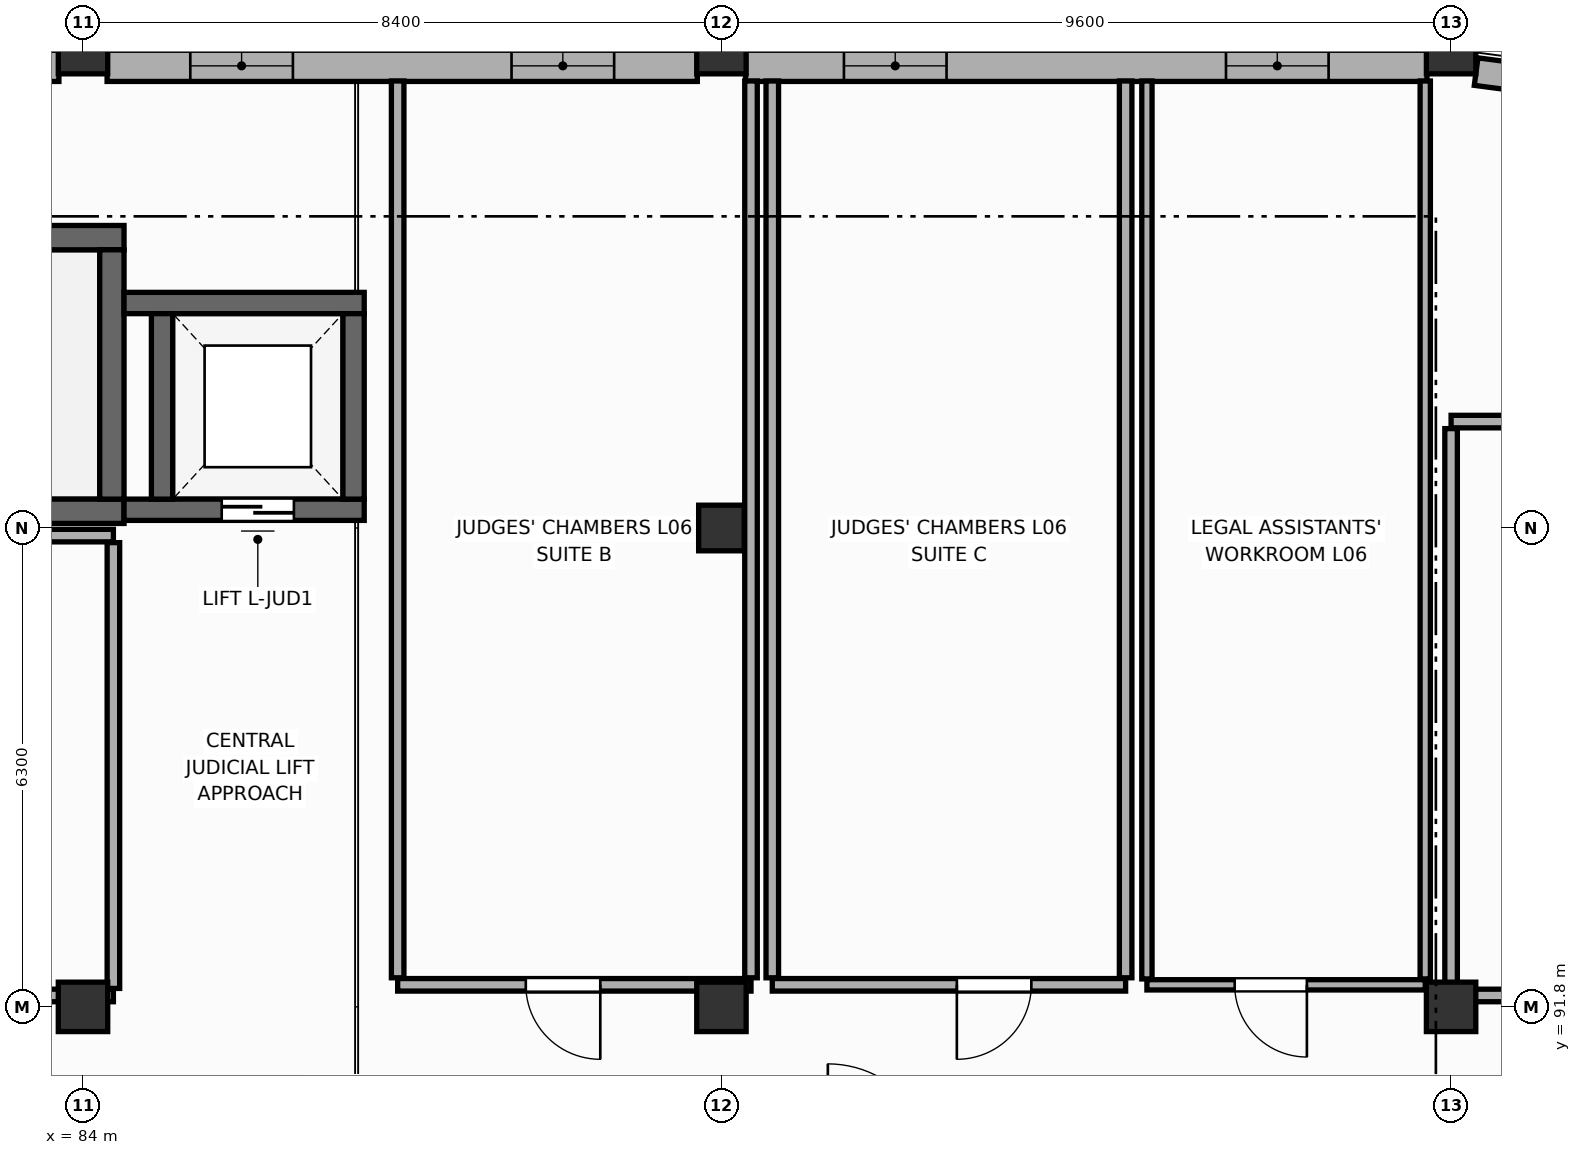
"""IFC4 building model, lengths in metres.
Left out: names, types, materials, properties, quantities, classifications, styles, units other than length and angle.
Written with IfcOpenShell. Run it as: python <this file> out.ifc"""

import sys

from ifc_helpers import new_model, si_unit, direction, frame, frame_2d, origin, origin_2d, place, context, subcontext, project, spatial, rectangle, extrude, element, fill, save


model = new_model("IFC4")
c1 = context("Model", 3, precision=1e-05, world=origin(), true_north=direction((0.0, 1.0)))
c2 = subcontext(c1, "Body", "Model", "MODEL_VIEW")
j1 = project(units=[si_unit("LENGTHUNIT", "METRE"), si_unit("PLANEANGLEUNIT", "RADIAN")], contexts=[c1])
p1 = place(None, origin())
s1 = spatial("IfcSite", under=j1, at=p1, CompositionType="ELEMENT")
p2 = place(p1, origin())
s2 = spatial("IfcBuilding", under=s1, at=p2, CompositionType="ELEMENT")
p3 = place(p2, frame((0.0, 0.0, 22.8)))
s3 = spatial("IfcBuildingStorey", under=s2, at=p3, CompositionType="ELEMENT", Elevation=22.8)
for number, where, z_axis, x_axis in (
    (1, (84.0, 91.8, 0.0), (0.0, 0.0, 1.0), (1.0, 0.0, 0.0)),
    (2, (84.0, 104.4, 0.0), (0.0, 0.0, 1.0), (1.0, 0.0, 0.0)),
    (3, (92.4, 91.8, 0.0), (0.0, 0.0, 1.0), (1.0, 0.0, 0.0)),
    (4, (92.4, 104.4, 0.0), (0.0, 0.0, 1.0), (1.0, 0.0, 0.0)),
):
    element("IfcColumn", number, at=place(p3, frame(where, z_axis=z_axis, x_axis=x_axis)), inside=s3, PredefinedType="COLUMN", context=c2, shape_type="SweptSolid", body=[
        extrude(rectangle(XDim=0.65, YDim=0.65, at=origin_2d()), origin(), (0.0, 0.0, 1.0), 4.2),
    ])
p4 = place(p3, frame((92.4, 98.1, 0.0), z_axis=(0.0, 0.0, 1.0), x_axis=(1.0, 0.0, 0.0)))
e5 = element("IfcColumn", 5, at=p4, inside=s3, PredefinedType="COLUMN", context=c2, shape_type="SweptSolid", body=[
    extrude(rectangle(XDim=0.6, YDim=0.6, at=origin_2d()), origin(), (0.0, 0.0, 1.0), 4.2),
])
for number, where, z_axis, x_axis in (
    (6, (102.0, 91.8, 0.0), (0.0, 0.0, 1.0), (1.0, 0.0, 0.0)),
    (7, (102.0, 104.4, 0.0), (0.0, 0.0, 1.0), (1.0, 0.0, 0.0)),
):
    element("IfcColumn", number, at=place(p3, frame(where, z_axis=z_axis, x_axis=x_axis)), inside=s3, PredefinedType="COLUMN", context=c2, shape_type="SweptSolid", body=[
        extrude(rectangle(XDim=0.65, YDim=0.65, at=origin_2d()), origin(), (0.0, 0.0, 1.0), 4.2),
    ])
p5 = place(p3, frame((75.917, 104.18, 0.0), z_axis=(0.0, 0.0, 1.0), x_axis=(1.0, 0.0, 0.0)))
e8 = element("IfcWall", 8, at=p5, inside=s3, PredefinedType="STANDARD", context=c2, shape_type="SweptSolid", body=[
    extrude(rectangle(XDim=7.766, YDim=0.41, at=frame_2d((3.883, 0.0))), origin(), (0.0, 0.0, 1.0), 3.1),
])
p6 = place(p3, frame((84.317, 104.18, 0.0), z_axis=(0.0, 0.0, 1.0), x_axis=(1.0, 0.0, 0.0)))
e9 = element("IfcWall", 9, at=p6, inside=s3, PredefinedType="STANDARD", context=c2, shape_type="SweptSolid", body=[
    extrude(rectangle(XDim=7.766, YDim=0.41, at=frame_2d((3.883, 0.0))), origin(), (0.0, 0.0, 1.0), 3.1),
])
p7 = place(p6, frame((1.095, 0.0, 0.85)))
e10 = element("IfcOpeningElement", 10, at=p7, cuts=e9, PredefinedType="OPENING", context=c2, shape_type="SweptSolid", body=[
    extrude(rectangle(XDim=1.35, YDim=1.95, at=frame_2d((0.675, 0.975))), frame((0.0, 0.215, 0.0), z_axis=(0.0, -1.0, 0.0), x_axis=(1.0, 0.0, 0.0)), (0.0, 0.0, 1.0), 0.43),
])
p8 = place(p6, frame((5.321, 0.0, 0.85)))
e11 = element("IfcOpeningElement", 11, at=p8, cuts=e9, PredefinedType="OPENING", context=c2, shape_type="SweptSolid", body=[
    extrude(rectangle(XDim=1.35, YDim=1.95, at=frame_2d((0.675, 0.975))), frame((0.0, 0.215, 0.0), z_axis=(0.0, -1.0, 0.0), x_axis=(1.0, 0.0, 0.0)), (0.0, 0.0, 1.0), 0.43),
])
p9 = place(p3, frame((92.717, 104.18, 0.0), z_axis=(0.0, 0.0, 1.0), x_axis=(1.0, 0.0, 0.0)))
e12 = element("IfcWall", 12, at=p9, inside=s3, PredefinedType="STANDARD", context=c2, shape_type="SweptSolid", body=[
    extrude(rectangle(XDim=8.966, YDim=0.41, at=frame_2d((4.483, 0.0))), origin(), (0.0, 0.0, 1.0), 3.1),
])
p10 = place(p9, frame((1.295, 0.0, 0.85)))
e13 = element("IfcOpeningElement", 13, at=p10, cuts=e12, PredefinedType="OPENING", context=c2, shape_type="SweptSolid", body=[
    extrude(rectangle(XDim=1.35, YDim=1.95, at=frame_2d((0.675, 0.975))), frame((0.0, 0.215, 0.0), z_axis=(0.0, -1.0, 0.0), x_axis=(1.0, 0.0, 0.0)), (0.0, 0.0, 1.0), 0.43),
])
p11 = place(p9, frame((6.321, 0.0, 0.85)))
e14 = element("IfcOpeningElement", 14, at=p11, cuts=e12, PredefinedType="OPENING", context=c2, shape_type="SweptSolid", body=[
    extrude(rectangle(XDim=1.35, YDim=1.95, at=frame_2d((0.675, 0.975))), frame((0.0, 0.215, 0.0), z_axis=(0.0, -1.0, 0.0), x_axis=(1.0, 0.0, 0.0)), (0.0, 0.0, 1.0), 0.43),
])
p12 = place(p3, frame((105.229, 103.723, 0.0), z_axis=(0.0, 0.0, 1.0), x_axis=(-0.99144889538, 0.13049554724, 0.0)))
e15 = element("IfcWall", 15, at=p12, inside=s3, PredefinedType="ELEMENTEDWALL", context=c2, shape_type="SweptSolid", body=[
    extrude(rectangle(XDim=2.924, YDim=0.365, at=frame_2d((1.462, 0.0))), origin(), (0.0, 0.0, 1.0), 3.1),
])
p13 = place(p12, frame((1.062, 0.0, 0.85)))
e16 = element("IfcOpeningElement", 16, at=p13, cuts=e15, PredefinedType="OPENING", context=c2, shape_type="SweptSolid", body=[
    extrude(rectangle(XDim=0.8, YDim=1.7, at=frame_2d((0.4, 0.85))), frame((0.0, 0.192, 0.0), z_axis=(0.0, -1.0, 0.0), x_axis=(1.0, 0.0, 0.0)), (0.0, 0.0, 1.0), 0.385),
])
for number, where, z_axis, x_axis in (
    (17, (75.46, 101.92, 0.0), (0.0, 0.0, 1.0), (1.0, 0.0, 0.0)),
    (18, (84.54, 98.32, 0.0), (0.0, 0.0, 1.0), (-1.0, 0.0, 0.0)),
):
    element("IfcWall", number, at=place(p3, frame(where, z_axis=z_axis, x_axis=x_axis)), inside=s3, PredefinedType="SHEAR", context=c2, shape_type="SweptSolid", body=[
        extrude(rectangle(XDim=9.08, YDim=0.32, at=frame_2d((4.54, 0.0))), origin(), (0.0, 0.0, 1.0), 3.97),
    ])
p14 = place(p3, frame((84.38, 101.76, 0.0), z_axis=(0.0, 0.0, 1.0), x_axis=(0.0, -1.0, 0.0)))
e19 = element("IfcWall", 19, at=p14, inside=s3, PredefinedType="SHEAR", context=c2, shape_type="SweptSolid", body=[
    extrude(rectangle(XDim=3.28, YDim=0.32, at=frame_2d((1.64, 0.0))), origin(), (0.0, 0.0, 1.0), 3.97),
])
p15 = place(p3, frame((84.54, 101.06, 0.0), z_axis=(0.0, 0.0, 1.0), x_axis=(1.0, 0.0, 0.0)))
e20 = element("IfcWall", 20, at=p15, inside=s3, PredefinedType="SHEAR", context=c2, shape_type="SweptSolid", body=[
    extrude(rectangle(XDim=3.16, YDim=0.28, at=frame_2d((1.58, 0.0))), origin(), (0.0, 0.0, 1.0), 3.97),
])
p16 = place(p3, frame((87.7, 98.34, 0.0), z_axis=(0.0, 0.0, 1.0), x_axis=(-1.0, 0.0, 0.0)))
e21 = element("IfcWall", 21, at=p16, inside=s3, PredefinedType="SHEAR", context=c2, shape_type="SweptSolid", body=[
    extrude(rectangle(XDim=3.16, YDim=0.28, at=frame_2d((1.58, 0.0))), origin(), (0.0, 0.0, 1.0), 3.97),
])
p17 = place(p16, frame((0.925, 0.0, 0.0)))
e22 = element("IfcOpeningElement", 22, at=p17, cuts=e21, PredefinedType="OPENING", context=c2, shape_type="SweptSolid", body=[
    extrude(rectangle(XDim=0.95, YDim=2.15, at=frame_2d((0.475, 1.075))), frame((0.0, 0.15, 0.0), z_axis=(0.0, -1.0, 0.0), x_axis=(1.0, 0.0, 0.0)), (0.0, 0.0, 1.0), 0.3),
])
for number, where, z_axis, x_axis in (
    (23, (85.04, 98.48, 0.0), (0.0, 0.0, 1.0), (0.0, 1.0, 0.0)),
    (24, (87.56, 100.92, 0.0), (0.0, 0.0, 1.0), (0.0, -1.0, 0.0)),
):
    element("IfcWall", number, at=place(p3, frame(where, z_axis=z_axis, x_axis=x_axis)), inside=s3, PredefinedType="SHEAR", context=c2, shape_type="SweptSolid", body=[
        extrude(rectangle(XDim=2.44, YDim=0.28, at=frame_2d((1.22, 0.0))), origin(), (0.0, 0.0, 1.0), 3.97),
    ])
p18 = place(p3, frame((75.6, 98.0, 0.0), z_axis=(0.0, 0.0, 1.0), x_axis=(1.0, 0.0, 0.0)))
e25 = element("IfcWall", 25, at=p18, inside=s3, PredefinedType="PARTITIONING", context=c2, shape_type="SweptSolid", body=[
    extrude(rectangle(XDim=8.8, YDim=0.165, at=frame_2d((4.4, 0.0))), origin(), (0.0, 0.0, 1.0), 3.1),
])
p19 = place(p3, frame((84.4, 91.95, 0.0), z_axis=(0.0, 0.0, 1.0), x_axis=(-1.0, 0.0, 0.0)))
e26 = element("IfcWall", 26, at=p19, inside=s3, PredefinedType="PARTITIONING", context=c2, shape_type="SweptSolid", body=[
    extrude(rectangle(XDim=8.8, YDim=0.165, at=frame_2d((4.4, 0.0))), origin(), (0.0, 0.0, 1.0), 3.1),
])
p20 = place(p19, frame((3.545, 0.0, 0.0)))
e27 = element("IfcOpeningElement", 27, at=p20, cuts=e26, PredefinedType="OPENING", context=c2, shape_type="SweptSolid", body=[
    extrude(rectangle(XDim=1.0, YDim=2.15, at=frame_2d((0.5, 1.075))), frame((0.0, 0.093, 0.0), z_axis=(0.0, -1.0, 0.0), x_axis=(1.0, 0.0, 0.0)), (0.0, 0.0, 1.0), 0.185),
])
p21 = place(p3, frame((84.4, 97.907, 0.0), z_axis=(0.0, 0.0, 1.0), x_axis=(0.0, -1.0, 0.0)))
e28 = element("IfcWall", 28, at=p21, inside=s3, PredefinedType="PARTITIONING", context=c2, shape_type="SweptSolid", body=[
    extrude(rectangle(XDim=5.865, YDim=0.165, at=frame_2d((2.933, 0.0))), origin(), (0.0, 0.0, 1.0), 3.1),
])
p22 = place(p3, frame((92.789, 92.09, 0.0), z_axis=(0.0, 0.0, 1.0), x_axis=(-1.0, 0.0, 0.0)))
e29 = element("IfcWall", 29, at=p22, inside=s3, PredefinedType="PARTITIONING", context=c2, shape_type="SweptSolid", body=[
    extrude(rectangle(XDim=4.649, YDim=0.165, at=frame_2d((2.325, 0.0))), origin(), (0.0, 0.0, 1.0), 3.3),
])
p23 = place(p22, frame((1.983, 0.0, 0.0)))
e30 = element("IfcOpeningElement", 30, at=p23, cuts=e29, PredefinedType="OPENING", context=c2, shape_type="SweptSolid", body=[
    extrude(rectangle(XDim=0.98, YDim=2.2, at=frame_2d((0.49, 1.1))), frame((0.0, 0.093, 0.0), z_axis=(0.0, -1.0, 0.0), x_axis=(1.0, 0.0, 0.0)), (0.0, 0.0, 1.0), 0.185),
])
p24 = place(p3, frame((88.14, 92.183, 0.0), z_axis=(0.0, 0.0, 1.0), x_axis=(0.0, 1.0, 0.0)))
e31 = element("IfcWall", 31, at=p24, inside=s3, PredefinedType="PARTITIONING", context=c2, shape_type="SweptSolid", body=[
    extrude(rectangle(XDim=11.798, YDim=0.165, at=frame_2d((5.899, 0.0))), origin(), (0.0, 0.0, 1.0), 3.4),
])
p25 = place(p3, frame((92.789, 103.981, 0.0), z_axis=(0.0, 0.0, 1.0), x_axis=(0.0, -1.0, 0.0)))
e32 = element("IfcWall", 32, at=p25, inside=s3, PredefinedType="PARTITIONING", context=c2, shape_type="SweptSolid", body=[
    extrude(rectangle(XDim=11.798, YDim=0.165, at=frame_2d((5.899, 0.0))), origin(), (0.0, 0.0, 1.0), 3.3),
])
p26 = place(p3, frame((97.718, 92.09, 0.0), z_axis=(0.0, 0.0, 1.0), x_axis=(-1.0, 0.0, 0.0)))
e33 = element("IfcWall", 33, at=p26, inside=s3, PredefinedType="PARTITIONING", context=c2, shape_type="SweptSolid", body=[
    extrude(rectangle(XDim=4.649, YDim=0.165, at=frame_2d((2.324, 0.0))), origin(), (0.0, 0.0, 1.0), 3.3),
])
p27 = place(p26, frame((1.241, 0.0, 0.0)))
e34 = element("IfcOpeningElement", 34, at=p27, cuts=e33, PredefinedType="OPENING", context=c2, shape_type="SweptSolid", body=[
    extrude(rectangle(XDim=0.98, YDim=2.2, at=frame_2d((0.49, 1.1))), frame((0.0, 0.093, 0.0), z_axis=(0.0, -1.0, 0.0), x_axis=(1.0, 0.0, 0.0)), (0.0, 0.0, 1.0), 0.185),
])
for number, where, z_axis, x_axis in (
    (35, (93.069, 92.183, 0.0), (0.0, 0.0, 1.0), (0.0, 1.0, 0.0)),
    (36, (97.718, 103.981, 0.0), (0.0, 0.0, 1.0), (0.0, -1.0, 0.0)),
):
    element("IfcWall", number, at=place(p3, frame(where, z_axis=z_axis, x_axis=x_axis)), inside=s3, PredefinedType="PARTITIONING", context=c2, shape_type="SweptSolid", body=[
        extrude(rectangle(XDim=11.798, YDim=0.165, at=frame_2d((5.899, 0.0))), origin(), (0.0, 0.0, 1.0), 3.3),
    ])
p28 = place(p3, frame((101.66, 92.09, 0.0), z_axis=(0.0, 0.0, 1.0), x_axis=(-1.0, 0.0, 0.0)))
e37 = element("IfcWall", 37, at=p28, inside=s3, PredefinedType="PARTITIONING", context=c2, shape_type="SweptSolid", body=[
    extrude(rectangle(XDim=3.662, YDim=0.135, at=frame_2d((1.831, 0.0))), origin(), (0.0, 0.0, 1.0), 3.1),
])
p29 = place(p28, frame((1.557, 0.0, 0.0)))
e38 = element("IfcOpeningElement", 38, at=p29, cuts=e37, PredefinedType="OPENING", context=c2, shape_type="SweptSolid", body=[
    extrude(rectangle(XDim=0.95, YDim=2.15, at=frame_2d((0.475, 1.075))), frame((0.0, 0.077, 0.0), z_axis=(0.0, -1.0, 0.0), x_axis=(1.0, 0.0, 0.0)), (0.0, 0.0, 1.0), 0.155),
])
p30 = place(p3, frame((97.998, 92.167, 0.0), z_axis=(0.0, 0.0, 1.0), x_axis=(0.0, 1.0, 0.0)))
e39 = element("IfcWall", 39, at=p30, inside=s3, PredefinedType="PARTITIONING", context=c2, shape_type="SweptSolid", body=[
    extrude(rectangle(XDim=11.813, YDim=0.135, at=frame_2d((5.907, 0.0))), origin(), (0.0, 0.0, 1.0), 3.3),
])
p31 = place(p3, frame((101.66, 103.981, 0.0), z_axis=(0.0, 0.0, 1.0), x_axis=(0.0, -1.0, 0.0)))
e40 = element("IfcWall", 40, at=p31, inside=s3, PredefinedType="PARTITIONING", context=c2, shape_type="SweptSolid", body=[
    extrude(rectangle(XDim=11.813, YDim=0.135, at=frame_2d((5.907, 0.0))), origin(), (0.0, 0.0, 1.0), 3.1),
])
p32 = place(p3, frame((102.0, 99.5, 0.0), z_axis=(0.0, 0.0, 1.0), x_axis=(1.0, 0.0, 0.0)))
e41 = element("IfcWall", 41, at=p32, inside=s3, PredefinedType="PARTITIONING", context=c2, shape_type="SweptSolid", body=[
    extrude(rectangle(XDim=9.5, YDim=0.165, at=frame_2d((4.75, 0.0))), origin(), (0.0, 0.0, 1.0), 3.0),
])
p33 = place(p3, frame((111.5, 91.95, 0.0), z_axis=(0.0, 0.0, 1.0), x_axis=(-1.0, 0.0, 0.0)))
e42 = element("IfcWall", 42, at=p33, inside=s3, PredefinedType="PARTITIONING", context=c2, shape_type="SweptSolid", body=[
    extrude(rectangle(XDim=9.5, YDim=0.165, at=frame_2d((4.75, 0.0))), origin(), (0.0, 0.0, 1.0), 3.0),
])
p34 = place(p33, frame((1.132, 0.0, 0.0)))
e43 = element("IfcOpeningElement", 43, at=p34, cuts=e42, PredefinedType="OPENING", context=c2, shape_type="SweptSolid", body=[
    extrude(rectangle(XDim=0.98, YDim=2.2, at=frame_2d((0.49, 1.1))), frame((0.0, 0.093, 0.0), z_axis=(0.0, -1.0, 0.0), x_axis=(1.0, 0.0, 0.0)), (0.0, 0.0, 1.0), 0.185),
])
p35 = place(p3, frame((102.0, 92.042, 0.0), z_axis=(0.0, 0.0, 1.0), x_axis=(0.0, 1.0, 0.0)))
e44 = element("IfcWall", 44, at=p35, inside=s3, PredefinedType="PARTITIONING", context=c2, shape_type="SweptSolid", body=[
    extrude(rectangle(XDim=7.365, YDim=0.165, at=frame_2d((3.683, 0.0))), origin(), (0.0, 0.0, 1.0), 3.1),
])
p36 = place(p7, origin())
e45 = element("IfcWindow", 45, at=p36, inside=s3, PartitioningType="SINGLE_PANEL", PredefinedType="WINDOW", context=c2, shape_type="SweptSolid", body=[
    extrude(rectangle(XDim=1.35, YDim=1.95, at=frame_2d((0.675, 0.975))), frame((0.0, 0.03, 0.0), z_axis=(0.0, -1.0, 0.0), x_axis=(1.0, 0.0, 0.0)), (0.0, 0.0, 1.0), 0.06),
])
fill(e10, e45)
p37 = place(p8, origin())
e46 = element("IfcWindow", 46, at=p37, inside=s3, PartitioningType="SINGLE_PANEL", PredefinedType="WINDOW", context=c2, shape_type="SweptSolid", body=[
    extrude(rectangle(XDim=1.35, YDim=1.95, at=frame_2d((0.675, 0.975))), frame((0.0, 0.03, 0.0), z_axis=(0.0, -1.0, 0.0), x_axis=(1.0, 0.0, 0.0)), (0.0, 0.0, 1.0), 0.06),
])
fill(e11, e46)
p38 = place(p10, origin())
e47 = element("IfcWindow", 47, at=p38, inside=s3, PartitioningType="SINGLE_PANEL", PredefinedType="WINDOW", context=c2, shape_type="SweptSolid", body=[
    extrude(rectangle(XDim=1.35, YDim=1.95, at=frame_2d((0.675, 0.975))), frame((0.0, 0.03, 0.0), z_axis=(0.0, -1.0, 0.0), x_axis=(1.0, 0.0, 0.0)), (0.0, 0.0, 1.0), 0.06),
])
fill(e13, e47)
p39 = place(p11, origin())
e48 = element("IfcWindow", 48, at=p39, inside=s3, PartitioningType="SINGLE_PANEL", PredefinedType="WINDOW", context=c2, shape_type="SweptSolid", body=[
    extrude(rectangle(XDim=1.35, YDim=1.95, at=frame_2d((0.675, 0.975))), frame((0.0, 0.03, 0.0), z_axis=(0.0, -1.0, 0.0), x_axis=(1.0, 0.0, 0.0)), (0.0, 0.0, 1.0), 0.06),
])
fill(e14, e48)
p40 = place(p17, origin())
e49 = element("IfcDoor", 49, at=p40, inside=s3, OperationType="DOUBLE_DOOR_SLIDING", PredefinedType="DOOR", context=c2, shape_type="SweptSolid", body=[
    extrude(rectangle(XDim=0.95, YDim=2.15, at=frame_2d((0.475, 1.075))), frame((0.0, 0.025, 0.0), z_axis=(0.0, -1.0, 0.0), x_axis=(1.0, 0.0, 0.0)), (0.0, 0.0, 1.0), 0.05),
])
fill(e22, e49)
p41 = place(p23, origin())
e50 = element("IfcDoor", 50, at=p41, inside=s3, OperationType="SINGLE_SWING_LEFT", PredefinedType="DOOR", context=c2, shape_type="SweptSolid", body=[
    extrude(rectangle(XDim=0.98, YDim=2.2, at=frame_2d((0.49, 1.1))), frame((0.0, 0.025, 0.0), z_axis=(0.0, -1.0, 0.0), x_axis=(1.0, 0.0, 0.0)), (0.0, 0.0, 1.0), 0.05),
])
fill(e30, e50)
p42 = place(p27, origin())
e51 = element("IfcDoor", 51, at=p42, inside=s3, OperationType="SINGLE_SWING_RIGHT", PredefinedType="DOOR", context=c2, shape_type="SweptSolid", body=[
    extrude(rectangle(XDim=0.98, YDim=2.2, at=frame_2d((0.49, 1.1))), frame((0.0, 0.025, 0.0), z_axis=(0.0, -1.0, 0.0), x_axis=(1.0, 0.0, 0.0)), (0.0, 0.0, 1.0), 0.05),
])
fill(e34, e51)
p43 = place(p29, origin())
e52 = element("IfcDoor", 52, at=p43, inside=s3, OperationType="SINGLE_SWING_LEFT", PredefinedType="DOOR", context=c2, shape_type="SweptSolid", body=[
    extrude(rectangle(XDim=0.95, YDim=2.15, at=frame_2d((0.475, 1.075))), frame((0.0, 0.025, 0.0), z_axis=(0.0, -1.0, 0.0), x_axis=(1.0, 0.0, 0.0)), (0.0, 0.0, 1.0), 0.05),
])
fill(e38, e52)
save(model, sys.argv[1])
